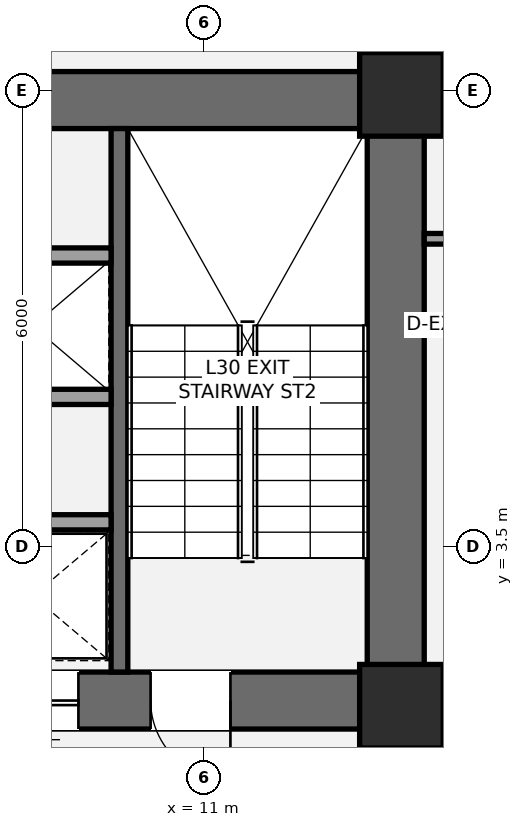
"""IFC4 building model, lengths in metres.
Left out: names, types, materials, properties, quantities, classifications, styles, units other than length and angle.
Written with IfcOpenShell. Run it as: python <this file> out.ifc"""

import sys

from ifc_helpers import new_model, si_unit, direction, frame, frame_2d, origin, origin_2d, place, context, subcontext, project, spatial, rectangle, extrude, element, fill, save


model = new_model("IFC4")
c1 = context("Model", 3, precision=1e-05, world=origin(), true_north=direction((0.0, 1.0)))
c2 = subcontext(c1, "Body", "Model", "MODEL_VIEW")
j1 = project(units=[si_unit("LENGTHUNIT", "METRE"), si_unit("PLANEANGLEUNIT", "RADIAN")], contexts=[c1])
p1 = place(None, origin())
s1 = spatial("IfcSite", under=j1, at=p1, CompositionType="ELEMENT")
p2 = place(p1, origin())
s2 = spatial("IfcBuilding", under=s1, at=p2, CompositionType="ELEMENT")
p3 = place(p2, frame((0.0, 0.0, 114.1)))
s3 = spatial("IfcBuildingStorey", under=s2, at=p3, CompositionType="ELEMENT", Elevation=114.1)
p4 = place(p3, frame((13.525, 1.1, 0.0), z_axis=(0.0, 0.0, 1.0), x_axis=(0.0, 1.0, 0.0)))
e1 = element("IfcWall", 1, at=p4, inside=s3, PredefinedType="SHEAR", context=c2, shape_type="SweptSolid", body=[
    extrude(rectangle(XDim=8.65, YDim=0.75, at=frame_2d((4.325, 0.0))), origin(), (0.0, 0.0, 1.0), 3.5),
])
p5 = place(p3, frame((4.425, 9.375, 0.0), z_axis=(0.0, 0.0, 1.0), x_axis=(1.0, 0.0, 0.0)))
e2 = element("IfcWall", 2, at=p5, inside=s3, PredefinedType="SHEAR", context=c2, shape_type="SweptSolid", body=[
    extrude(rectangle(XDim=9.475, YDim=0.75, at=frame_2d((4.737, 0.0))), origin(), (0.0, 0.0, 1.0), 3.5),
])
p6 = place(p3, frame((13.9, 1.475, 0.0), z_axis=(0.0, 0.0, 1.0), x_axis=(-1.0, 0.0, 0.0)))
e3 = element("IfcWall", 3, at=p6, inside=s3, PredefinedType="SHEAR", context=c2, shape_type="SweptSolid", body=[
    extrude(rectangle(XDim=9.075, YDim=0.75, at=frame_2d((4.538, 0.0))), origin(), (0.0, 0.0, 1.0), 3.5),
])
p7 = place(p6, frame((2.55, 0.0, 0.0)))
e4 = element("IfcOpeningElement", 4, at=p7, cuts=e3, PredefinedType="OPENING", context=c2, shape_type="SweptSolid", body=[
    extrude(rectangle(XDim=1.05, YDim=2.15, at=frame_2d((0.525, 1.075))), frame((0.0, 0.385, 0.0), z_axis=(0.0, -1.0, 0.0), x_axis=(1.0, 0.0, 0.0)), (0.0, 0.0, 1.0), 0.77),
])
p8 = place(p6, frame((4.55, 0.0, 0.0)))
e5 = element("IfcOpeningElement", 5, at=p8, cuts=e3, PredefinedType="OPENING", context=c2, shape_type="SweptSolid", body=[
    extrude(rectangle(XDim=1.1, YDim=2.2, at=frame_2d((0.55, 1.1))), frame((0.0, 0.385, 0.0), z_axis=(0.0, -1.0, 0.0), x_axis=(1.0, 0.0, 0.0)), (0.0, 0.0, 1.0), 0.77),
])
p9 = place(p3, frame((9.89, 1.85, 0.0), z_axis=(0.0, 0.0, 1.0), x_axis=(0.0, 1.0, 0.0)))
e6 = element("IfcWall", 6, at=p9, inside=s3, PredefinedType="SHEAR", context=c2, shape_type="SweptSolid", body=[
    extrude(rectangle(XDim=7.15, YDim=0.22, at=frame_2d((3.575, 0.0))), origin(), (0.0, 0.0, 1.0), 3.5),
])
for number, where, z_axis, x_axis in (
    (7, (13.6, 1.4, 0.0), (0.0, 0.0, 1.0), (1.0, 0.0, 0.0)),
    (8, (13.6, 9.45, 0.0), (0.0, 0.0, 1.0), (1.0, 0.0, 0.0)),
):
    element("IfcColumn", number, at=place(p3, frame(where, z_axis=z_axis, x_axis=x_axis)), inside=s3, PredefinedType="COLUMN", context=c2, shape_type="SweptSolid", body=[
        extrude(rectangle(XDim=1.1, YDim=1.1, at=origin_2d()), origin(), (0.0, 0.0, 1.0), 3.5),
    ])
p10 = place(p3, frame((13.45, -2.15, 0.0), z_axis=(0.0, 0.0, 1.0), x_axis=(0.0, 1.0, 0.0)))
e9 = element("IfcWall", 9, at=p10, inside=s3, PredefinedType="PARTITIONING", context=c2, shape_type="SweptSolid", body=[
    extrude(rectangle(XDim=3.3, YDim=0.165, at=frame_2d((1.65, 0.0))), origin(), (0.0, 0.0, 1.0), 2.763),
])
p11 = place(p10, frame((1.15, 0.0, 0.0)))
e10 = element("IfcOpeningElement", 10, at=p11, cuts=e9, PredefinedType="OPENING", context=c2, shape_type="SweptSolid", body=[
    extrude(rectangle(XDim=1.05, YDim=2.15, at=frame_2d((0.525, 1.075))), frame((0.0, 0.093, 0.0), z_axis=(0.0, -1.0, 0.0), x_axis=(1.0, 0.0, 0.0)), (0.0, 0.0, 1.0), 0.185),
])
p12 = place(p3, frame((5.575, 3.82, 0.0), z_axis=(0.0, 0.0, 1.0), x_axis=(1.0, 0.0, 0.0)))
e11 = element("IfcWall", 11, at=p12, inside=s3, PredefinedType="SOLIDWALL", context=c2, shape_type="SweptSolid", body=[
    extrude(rectangle(XDim=4.205, YDim=0.2, at=frame_2d((2.103, 0.0))), origin(), (0.0, 0.0, 1.0), 3.31),
])
p13 = place(p12, frame((0.65, 0.0, 0.0)))
e12 = element("IfcOpeningElement", 12, at=p13, cuts=e11, PredefinedType="OPENING", context=c2, shape_type="SweptSolid", body=[
    extrude(rectangle(XDim=1.2, YDim=2.2, at=frame_2d((0.6, 1.1))), frame((0.0, 0.11, 0.0), z_axis=(0.0, -1.0, 0.0), x_axis=(1.0, 0.0, 0.0)), (0.0, 0.0, 1.0), 0.22),
])
for number, where, z_axis, x_axis in (
    (13, (5.575, 5.47, 0.0), (0.0, 0.0, 1.0), (1.0, 0.0, 0.0)),
    (14, (5.575, 7.33, 0.0), (0.0, 0.0, 1.0), (1.0, 0.0, 0.0)),
):
    element("IfcWall", number, at=place(p3, frame(where, z_axis=z_axis, x_axis=x_axis)), inside=s3, PredefinedType="SOLIDWALL", context=c2, shape_type="SweptSolid", body=[
        extrude(rectangle(XDim=4.205, YDim=0.2, at=frame_2d((2.103, 0.0))), origin(), (0.0, 0.0, 1.0), 3.31),
    ])
p14 = place(p3, frame((13.9, 7.55, 0.0), z_axis=(0.0, 0.0, 1.0), x_axis=(1.0, 0.0, 0.0)))
e15 = element("IfcWall", 15, at=p14, inside=s3, PredefinedType="PARTITIONING", context=c2, shape_type="SweptSolid", body=[
    extrude(rectangle(XDim=2.5, YDim=0.14, at=frame_2d((1.25, 0.0))), origin(), (0.0, 0.0, 1.0), 2.763),
])
p15 = place(p14, frame((0.32, 0.0, 0.0)))
e16 = element("IfcOpeningElement", 16, at=p15, cuts=e15, PredefinedType="OPENING", context=c2, shape_type="SweptSolid", body=[
    extrude(rectangle(XDim=0.92, YDim=2.15, at=frame_2d((0.46, 1.075))), frame((0.0, 0.08, 0.0), z_axis=(0.0, -1.0, 0.0), x_axis=(1.0, 0.0, 0.0)), (0.0, 0.0, 1.0), 0.16),
])
p16 = place(p7, origin())
e17 = element("IfcDoor", 17, at=p16, inside=s3, OperationType="SINGLE_SWING_LEFT", PredefinedType="DOOR", context=c2, shape_type="SweptSolid", body=[
    extrude(rectangle(XDim=1.05, YDim=2.15, at=frame_2d((0.525, 1.075))), frame((0.0, 0.025, 0.0), z_axis=(0.0, -1.0, 0.0), x_axis=(1.0, 0.0, 0.0)), (0.0, 0.0, 1.0), 0.05),
])
fill(e4, e17)
p17 = place(p8, origin())
e18 = element("IfcDoor", 18, at=p17, inside=s3, OperationType="SLIDING_TO_LEFT", PredefinedType="DOOR", context=c2, shape_type="SweptSolid", body=[
    extrude(rectangle(XDim=1.1, YDim=2.2, at=frame_2d((0.55, 1.1))), frame((0.0, 0.025, 0.0), z_axis=(0.0, -1.0, 0.0), x_axis=(1.0, 0.0, 0.0)), (0.0, 0.0, 1.0), 0.05),
])
fill(e5, e18)
save(model, sys.argv[1])
